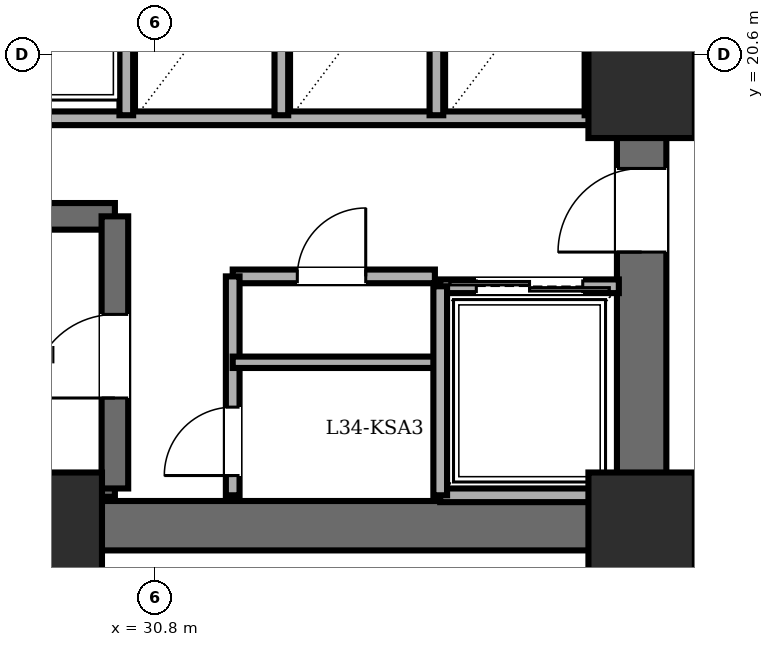
"""IFC4 building model, lengths in metres.
Left out: names, types, materials, properties, quantities, classifications, styles, units other than length and angle.
Written with IfcOpenShell. Run it as: python <this file> out.ifc"""

import sys

from ifc_helpers import new_model, si_unit, direction, frame, frame_2d, origin, origin_2d, place, context, subcontext, project, spatial, rectangle, extrude, element, fill, save


model = new_model("IFC4")
c1 = context("Model", 3, precision=1e-05, world=origin(), true_north=direction((0.0, 1.0)))
c2 = subcontext(c1, "Body", "Model", "MODEL_VIEW")
j1 = project(units=[si_unit("LENGTHUNIT", "METRE"), si_unit("PLANEANGLEUNIT", "RADIAN")], contexts=[c1])
p1 = place(None, origin())
s1 = spatial("IfcSite", under=j1, at=p1, CompositionType="ELEMENT")
p2 = place(p1, origin())
s2 = spatial("IfcBuilding", under=s1, at=p2, CompositionType="ELEMENT")
p3 = place(p2, frame((0.0, 0.0, 129.5)))
s3 = spatial("IfcBuildingStorey", under=s2, at=p3, CompositionType="ELEMENT", Elevation=129.5)
for number, where, z_axis, x_axis in (
    (1, (29.4, 14.4, 0.0), (0.0, 0.0, 1.0), (1.0, 0.0, 0.0)),
    (2, (37.2, 14.4, 0.0), (0.0, 0.0, 1.0), (1.0, 0.0, 0.0)),
    (3, (37.2, 20.2, 0.0), (0.0, 0.0, 1.0), (1.0, 0.0, 0.0)),
):
    element("IfcColumn", number, at=place(p3, frame(where, z_axis=z_axis, x_axis=x_axis)), inside=s3, PredefinedType="COLUMN", context=c2, shape_type="SweptSolid", body=[
        extrude(rectangle(XDim=1.4, YDim=1.4, at=origin_2d()), origin(), (0.0, 0.0, 1.0), 3.6),
    ])
p4 = place(p3, frame((37.2, 14.4, 0.0), z_axis=(0.0, 0.0, 1.0), x_axis=(-1.0, 0.0, 0.0)))
e4 = element("IfcWall", 4, at=p4, inside=s3, PredefinedType="SHEAR", context=c2, shape_type="SweptSolid", body=[
    extrude(rectangle(XDim=15.6, YDim=0.65, at=frame_2d((7.8, 0.0))), origin(), (0.0, 0.0, 1.0), 3.36),
])
p5 = place(p3, frame((37.2, 14.4, 0.0), z_axis=(0.0, 0.0, 1.0), x_axis=(0.0, 1.0, 0.0)))
e5 = element("IfcWall", 5, at=p5, inside=s3, PredefinedType="SHEAR", context=c2, shape_type="SweptSolid", body=[
    extrude(rectangle(XDim=19.2, YDim=0.65, at=frame_2d((9.6, 0.0))), origin(), (0.0, 0.0, 1.0), 3.36),
])
p6 = place(p5, frame((15.8, 0.0, 0.0)))
e6 = element("IfcOpeningElement", 6, at=p6, cuts=e5, PredefinedType="OPENING", context=c2, shape_type="SweptSolid", body=[
    extrude(rectangle(XDim=1.15, YDim=2.15, at=frame_2d((0.575, 1.075))), frame((0.0, 0.335, 0.0), z_axis=(0.0, -1.0, 0.0), x_axis=(1.0, 0.0, 0.0)), (0.0, 0.0, 1.0), 0.67),
])
p7 = place(p5, frame((3.6, 0.0, 0.0)))
e7 = element("IfcOpeningElement", 7, at=p7, cuts=e5, PredefinedType="OPENING", context=c2, shape_type="SweptSolid", body=[
    extrude(rectangle(XDim=1.1, YDim=2.15, at=frame_2d((0.55, 1.075))), frame((0.0, 0.335, 0.0), z_axis=(0.0, -1.0, 0.0), x_axis=(1.0, 0.0, 0.0)), (0.0, 0.0, 1.0), 0.67),
])
p8 = place(p5, frame((8.6, 0.0, 0.0)))
e8 = element("IfcOpeningElement", 8, at=p8, cuts=e5, PredefinedType="OPENING", context=c2, shape_type="SweptSolid", body=[
    extrude(rectangle(XDim=1.3, YDim=2.2, at=frame_2d((0.65, 1.1))), frame((0.0, 0.335, 0.0), z_axis=(0.0, -1.0, 0.0), x_axis=(1.0, 0.0, 0.0)), (0.0, 0.0, 1.0), 0.67),
])
p9 = place(p3, frame((22.48, 18.47, 0.0), z_axis=(0.0, 0.0, 1.0), x_axis=(1.0, 0.0, 0.0)))
e9 = element("IfcWall", 9, at=p9, inside=s3, PredefinedType="SOLIDWALL", context=c2, shape_type="SweptSolid", body=[
    extrude(rectangle(XDim=7.79, YDim=0.35, at=frame_2d((3.895, 0.0))), origin(), (0.0, 0.0, 1.0), 3.36),
])
p10 = place(p3, frame((22.48, 14.89, 0.0), z_axis=(0.0, 0.0, 1.0), x_axis=(1.0, 0.0, 0.0)))
e10 = element("IfcWall", 10, at=p10, inside=s3, PredefinedType="PARTITIONING", context=c2, shape_type="SweptSolid", body=[
    extrude(rectangle(XDim=7.79, YDim=0.22, at=frame_2d((3.895, 0.0))), origin(), (0.0, 0.0, 1.0), 3.36),
])
p11 = place(p3, frame((30.27, 14.89, 0.0), z_axis=(0.0, 0.0, 1.0), x_axis=(0.0, 1.0, 0.0)))
e11 = element("IfcWall", 11, at=p11, inside=s3, PredefinedType="SOLIDWALL", context=c2, shape_type="SweptSolid", body=[
    extrude(rectangle(XDim=3.58, YDim=0.35, at=frame_2d((1.79, 0.0))), origin(), (0.0, 0.0, 1.0), 3.36),
])
p12 = place(p11, frame((1.19, 0.0, 0.0)))
e12 = element("IfcOpeningElement", 12, at=p12, cuts=e11, PredefinedType="OPENING", context=c2, shape_type="SweptSolid", body=[
    extrude(rectangle(XDim=1.1, YDim=2.15, at=frame_2d((0.55, 1.075))), frame((0.0, 0.185, 0.0), z_axis=(0.0, -1.0, 0.0), x_axis=(1.0, 0.0, 0.0)), (0.0, 0.0, 1.0), 0.37),
])
p13 = place(p3, frame((21.95, 19.76, 0.0), z_axis=(0.0, 0.0, 1.0), x_axis=(1.0, 0.0, 0.0)))
e13 = element("IfcWall", 13, at=p13, inside=s3, PredefinedType="PARTITIONING", context=c2, shape_type="SweptSolid", body=[
    extrude(rectangle(XDim=14.87, YDim=0.18, at=frame_2d((7.435, 0.0))), origin(), (0.0, 0.0, 1.0), 3.36),
])
p14 = place(p3, frame((31.82, 17.68, 0.0), z_axis=(0.0, 0.0, 1.0), x_axis=(1.0, 0.0, 0.0)))
e14 = element("IfcWall", 14, at=p14, inside=s3, PredefinedType="PARTITIONING", context=c2, shape_type="SweptSolid", body=[
    extrude(rectangle(XDim=2.66, YDim=0.18, at=frame_2d((1.33, 0.0))), origin(), (0.0, 0.0, 1.0), 3.36),
])
p15 = place(p14, frame((0.85, 0.0, 0.0)))
e15 = element("IfcOpeningElement", 15, at=p15, cuts=e14, PredefinedType="OPENING", context=c2, shape_type="SweptSolid", body=[
    extrude(rectangle(XDim=0.9, YDim=2.05, at=frame_2d((0.45, 1.025))), frame((0.0, 0.1, 0.0), z_axis=(0.0, -1.0, 0.0), x_axis=(1.0, 0.0, 0.0)), (0.0, 0.0, 1.0), 0.2),
])
p16 = place(p3, frame((31.82, 14.8, 0.0), z_axis=(0.0, 0.0, 1.0), x_axis=(0.0, 1.0, 0.0)))
e16 = element("IfcWall", 16, at=p16, inside=s3, PredefinedType="PARTITIONING", context=c2, shape_type="SweptSolid", body=[
    extrude(rectangle(XDim=2.88, YDim=0.18, at=frame_2d((1.44, 0.0))), origin(), (0.0, 0.0, 1.0), 3.36),
])
p17 = place(p16, frame((0.26, 0.0, 0.0)))
e17 = element("IfcOpeningElement", 17, at=p17, cuts=e16, PredefinedType="OPENING", context=c2, shape_type="SweptSolid", body=[
    extrude(rectangle(XDim=0.9, YDim=2.05, at=frame_2d((0.45, 1.025))), frame((0.0, 0.1, 0.0), z_axis=(0.0, -1.0, 0.0), x_axis=(1.0, 0.0, 0.0)), (0.0, 0.0, 1.0), 0.2),
])
p18 = place(p3, frame((31.82, 16.55, 0.0), z_axis=(0.0, 0.0, 1.0), x_axis=(1.0, 0.0, 0.0)))
e18 = element("IfcWall", 18, at=p18, inside=s3, PredefinedType="PARTITIONING", context=c2, shape_type="SweptSolid", body=[
    extrude(rectangle(XDim=2.66, YDim=0.15, at=frame_2d((1.33, 0.0))), origin(), (0.0, 0.0, 1.0), 3.36),
])
p19 = place(p3, frame((34.55, 17.55, 0.0), z_axis=(0.0, 0.0, 1.0), x_axis=(1.0, 0.0, 0.0)))
e19 = element("IfcWall", 19, at=p19, inside=s3, PredefinedType="PARTITIONING", context=c2, shape_type="SweptSolid", body=[
    extrude(rectangle(XDim=2.35, YDim=0.18, at=frame_2d((1.175, 0.0))), origin(), (0.0, 0.0, 1.0), 3.36),
])
p20 = place(p19, frame((0.475, 0.0, 0.0)))
e20 = element("IfcOpeningElement", 20, at=p20, cuts=e19, PredefinedType="OPENING", context=c2, shape_type="SweptSolid", body=[
    extrude(rectangle(XDim=1.4, YDim=2.3, at=frame_2d((0.7, 1.15))), frame((0.0, 0.1, 0.0), z_axis=(0.0, -1.0, 0.0), x_axis=(1.0, 0.0, 0.0)), (0.0, 0.0, 1.0), 0.2),
])
p21 = place(p3, frame((36.9, 14.8, 0.0), z_axis=(0.0, 0.0, 1.0), x_axis=(-1.0, 0.0, 0.0)))
e21 = element("IfcWall", 21, at=p21, inside=s3, PredefinedType="PARTITIONING", context=c2, shape_type="SweptSolid", body=[
    extrude(rectangle(XDim=2.35, YDim=0.18, at=frame_2d((1.175, 0.0))), origin(), (0.0, 0.0, 1.0), 3.36),
])
p22 = place(p3, frame((34.55, 17.55, 0.0), z_axis=(0.0, 0.0, 1.0), x_axis=(0.0, -1.0, 0.0)))
e22 = element("IfcWall", 22, at=p22, inside=s3, PredefinedType="PARTITIONING", context=c2, shape_type="SweptSolid", body=[
    extrude(rectangle(XDim=2.75, YDim=0.18, at=frame_2d((1.375, 0.0))), origin(), (0.0, 0.0, 1.0), 3.36),
])
for number, where, z_axis, x_axis in (
    (23, (30.42, 19.8, 0.0), (0.0, 0.0, 1.0), (0.0, 1.0, 0.0)),
    (24, (32.46, 19.8, 0.0), (0.0, 0.0, 1.0), (0.0, 1.0, 0.0)),
    (25, (34.5, 19.8, 0.0), (0.0, 0.0, 1.0), (0.0, 1.0, 0.0)),
    (26, (36.54, 19.8, 0.0), (0.0, 0.0, 1.0), (0.0, 1.0, 0.0)),
):
    element("IfcWall", number, at=place(p3, frame(where, z_axis=z_axis, x_axis=x_axis)), inside=s3, PredefinedType="PARTITIONING", context=c2, shape_type="SweptSolid", body=[
        extrude(rectangle(XDim=2.5, YDim=0.18, at=frame_2d((1.25, 0.0))), origin(), (0.0, 0.0, 1.0), 3.36),
    ])
p23 = place(p12, origin())
e27 = element("IfcDoor", 27, at=p23, inside=s3, OperationType="SINGLE_SWING_LEFT", PredefinedType="DOOR", context=c2, shape_type="SweptSolid", body=[
    extrude(rectangle(XDim=1.1, YDim=2.15, at=frame_2d((0.55, 1.075))), frame((0.0, 0.025, 0.0), z_axis=(0.0, -1.0, 0.0), x_axis=(1.0, 0.0, 0.0)), (0.0, 0.0, 1.0), 0.05),
])
fill(e12, e27)
p24 = place(p7, origin())
e28 = element("IfcDoor", 28, at=p24, inside=s3, OperationType="SINGLE_SWING_LEFT", PredefinedType="DOOR", context=c2, shape_type="SweptSolid", body=[
    extrude(rectangle(XDim=1.1, YDim=2.15, at=frame_2d((0.55, 1.075))), frame((0.0, 0.025, 0.0), z_axis=(0.0, -1.0, 0.0), x_axis=(1.0, 0.0, 0.0)), (0.0, 0.0, 1.0), 0.05),
])
fill(e7, e28)
p25 = place(p15, origin())
e29 = element("IfcDoor", 29, at=p25, inside=s3, OperationType="SINGLE_SWING_RIGHT", PredefinedType="DOOR", context=c2, shape_type="SweptSolid", body=[
    extrude(rectangle(XDim=0.9, YDim=2.05, at=frame_2d((0.45, 1.025))), frame((0.0, 0.025, 0.0), z_axis=(0.0, -1.0, 0.0), x_axis=(1.0, 0.0, 0.0)), (0.0, 0.0, 1.0), 0.05),
])
fill(e15, e29)
p26 = place(p17, origin())
e30 = element("IfcDoor", 30, at=p26, inside=s3, OperationType="SINGLE_SWING_LEFT", PredefinedType="DOOR", context=c2, shape_type="SweptSolid", body=[
    extrude(rectangle(XDim=0.9, YDim=2.05, at=frame_2d((0.45, 1.025))), frame((0.0, 0.025, 0.0), z_axis=(0.0, -1.0, 0.0), x_axis=(1.0, 0.0, 0.0)), (0.0, 0.0, 1.0), 0.05),
])
fill(e17, e30)
p27 = place(p20, origin())
e31 = element("IfcDoor", 31, at=p27, inside=s3, OperationType="DOUBLE_DOOR_SLIDING", PredefinedType="DOOR", context=c2, shape_type="SweptSolid", body=[
    extrude(rectangle(XDim=1.4, YDim=2.3, at=frame_2d((0.7, 1.15))), frame((0.0, 0.025, 0.0), z_axis=(0.0, -1.0, 0.0), x_axis=(1.0, 0.0, 0.0)), (0.0, 0.0, 1.0), 0.05),
])
fill(e20, e31)
save(model, sys.argv[1])
